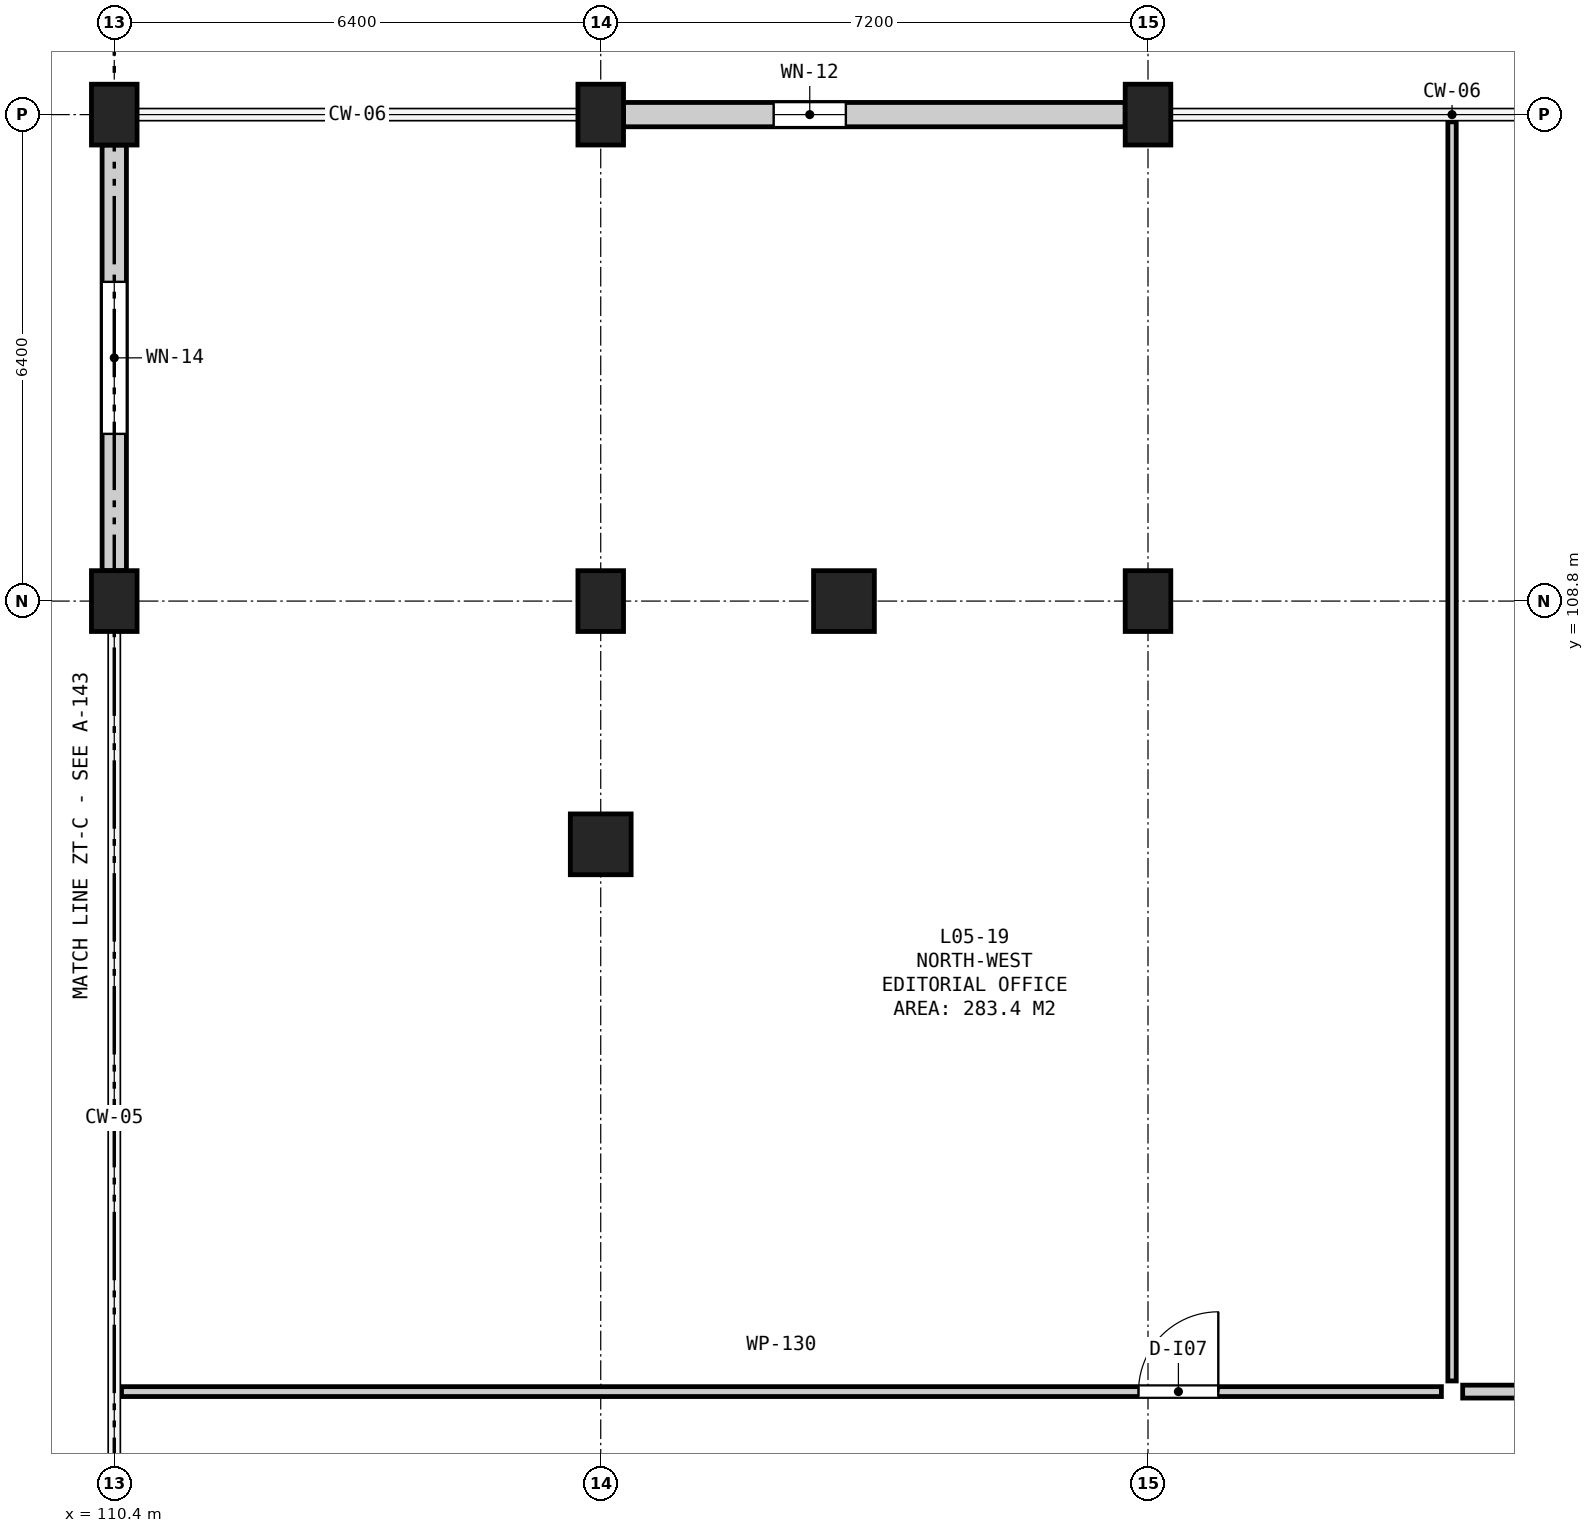
"""IFC4 building model, lengths in metres.
Left out: names, types, materials, properties, quantities, classifications, styles, units other than length and angle.
Written with IfcOpenShell. Run it as: python <this file> out.ifc"""

import sys

from ifc_helpers import new_model, si_unit, direction, frame, frame_2d, origin, origin_2d, place, context, subcontext, project, spatial, rectangle, circle, extrude, element, fill, save


model = new_model("IFC4")
c1 = context("Model", 3, precision=1e-05, world=origin(), true_north=direction((0.0, 1.0)))
c2 = subcontext(c1, "Body", "Model", "MODEL_VIEW")
j1 = project(units=[si_unit("LENGTHUNIT", "METRE"), si_unit("PLANEANGLEUNIT", "RADIAN")], contexts=[c1])
p1 = place(None, origin())
s1 = spatial("IfcSite", under=j1, at=p1, CompositionType="ELEMENT")
p2 = place(p1, origin())
s2 = spatial("IfcBuilding", under=s1, at=p2, CompositionType="ELEMENT")
p3 = place(p2, frame((0.0, 0.0, 23.8)))
s3 = spatial("IfcBuildingStorey", under=s2, at=p3, CompositionType="ELEMENT", Elevation=23.8)
for number, where, z_axis, x_axis in (
    (1, (110.4, 108.8, 0.0), (0.0, 0.0, 1.0), (1.0, 0.0, 0.0)),
    (2, (110.4, 115.2, 0.0), (0.0, 0.0, 1.0), (1.0, 0.0, 0.0)),
):
    element("IfcColumn", number, at=place(p3, frame(where, z_axis=z_axis, x_axis=x_axis)), inside=s3, PredefinedType="COLUMN", context=c2, shape_type="SweptSolid", body=[
        extrude(rectangle(XDim=0.6, YDim=0.8, at=origin_2d()), origin(), (0.0, 0.0, 1.0), 4.0),
    ])
p4 = place(p3, frame((116.8, 105.6, 0.0), z_axis=(0.0, 0.0, 1.0), x_axis=(1.0, 0.0, 0.0)))
e3 = element("IfcColumn", 3, at=p4, inside=s3, PredefinedType="COLUMN", context=c2, shape_type="SweptSolid", body=[
    extrude(circle(Radius=0.4, at=origin_2d()), origin(), (0.0, 0.0, 1.0), 4.0),
])
for number, where, z_axis, x_axis in (
    (4, (116.8, 108.8, 0.0), (0.0, 0.0, 1.0), (1.0, 0.0, 0.0)),
    (5, (116.8, 115.2, 0.0), (0.0, 0.0, 1.0), (1.0, 0.0, 0.0)),
):
    element("IfcColumn", number, at=place(p3, frame(where, z_axis=z_axis, x_axis=x_axis)), inside=s3, PredefinedType="COLUMN", context=c2, shape_type="SweptSolid", body=[
        extrude(rectangle(XDim=0.6, YDim=0.8, at=origin_2d()), origin(), (0.0, 0.0, 1.0), 4.0),
    ])
p5 = place(p3, frame((120.0, 108.8, 0.0), z_axis=(0.0, 0.0, 1.0), x_axis=(1.0, 0.0, 0.0)))
e6 = element("IfcColumn", 6, at=p5, inside=s3, PredefinedType="COLUMN", context=c2, shape_type="SweptSolid", body=[
    extrude(circle(Radius=0.4, at=origin_2d()), origin(), (0.0, 0.0, 1.0), 4.0),
])
for number, where, z_axis, x_axis in (
    (7, (124.0, 108.8, 0.0), (0.0, 0.0, 1.0), (1.0, 0.0, 0.0)),
    (8, (124.0, 115.2, 0.0), (0.0, 0.0, 1.0), (1.0, 0.0, 0.0)),
):
    element("IfcColumn", number, at=place(p3, frame(where, z_axis=z_axis, x_axis=x_axis)), inside=s3, PredefinedType="COLUMN", context=c2, shape_type="SweptSolid", body=[
        extrude(rectangle(XDim=0.6, YDim=0.8, at=origin_2d()), origin(), (0.0, 0.0, 1.0), 4.0),
    ])
p6 = place(p3, frame((123.7, 115.2, 0.0), z_axis=(0.0, 0.0, 1.0), x_axis=(-1.0, 0.0, 0.0)))
e9 = element("IfcWall", 9, at=p6, inside=s3, PredefinedType="SOLIDWALL", context=c2, shape_type="SweptSolid", body=[
    extrude(rectangle(XDim=6.6, YDim=0.32, at=frame_2d((3.3, 0.0))), origin(), (0.0, 0.0, 1.0), 3.1),
])
p7 = place(p6, frame((3.675, 0.0, 0.9)))
e10 = element("IfcOpeningElement", 10, at=p7, cuts=e9, PredefinedType="OPENING", context=c2, shape_type="SweptSolid", body=[
    extrude(rectangle(XDim=0.95, YDim=1.45, at=frame_2d((0.475, 0.725))), frame((0.0, 0.172, 0.0), z_axis=(0.0, -1.0, 0.0), x_axis=(1.0, 0.0, 0.0)), (0.0, 0.0, 1.0), 0.344),
])
p8 = place(p3, frame((110.4, 114.8, 0.0), z_axis=(0.0, 0.0, 1.0), x_axis=(0.0, -1.0, 0.0)))
e11 = element("IfcWall", 11, at=p8, inside=s3, PredefinedType="SOLIDWALL", context=c2, shape_type="SweptSolid", body=[
    extrude(rectangle(XDim=5.6, YDim=0.32, at=frame_2d((2.8, 0.0))), origin(), (0.0, 0.0, 1.0), 3.1),
])
p9 = place(p8, frame((1.8, 0.0, 0.9)))
e12 = element("IfcOpeningElement", 12, at=p9, cuts=e11, PredefinedType="OPENING", context=c2, shape_type="SweptSolid", body=[
    extrude(rectangle(XDim=2.0, YDim=1.65, at=frame_2d((1.0, 0.825))), frame((0.0, 0.172, 0.0), z_axis=(0.0, -1.0, 0.0), x_axis=(1.0, 0.0, 0.0)), (0.0, 0.0, 1.0), 0.344),
])
p10 = place(p3, frame((110.495, 98.4, 0.0), z_axis=(0.0, 0.0, 1.0), x_axis=(1.0, 0.0, 0.0)))
e13 = element("IfcWall", 13, at=p10, inside=s3, PredefinedType="PARTITIONING", context=c2, shape_type="SweptSolid", body=[
    extrude(rectangle(XDim=17.365, YDim=0.13, at=frame_2d((8.683, 0.0))), origin(), (0.0, 0.0, 1.0), 3.72),
])
p11 = place(p10, frame((13.38, 0.0, 0.0)))
e14 = element("IfcOpeningElement", 14, at=p11, cuts=e13, PredefinedType="OPENING", context=c2, shape_type="SweptSolid", body=[
    extrude(rectangle(XDim=1.05, YDim=2.15, at=frame_2d((0.525, 1.075))), frame((0.0, 0.077, 0.0), z_axis=(0.0, -1.0, 0.0), x_axis=(1.0, 0.0, 0.0)), (0.0, 0.0, 1.0), 0.154),
])
p12 = place(p3, frame((128.0, 98.54, 0.0), z_axis=(0.0, 0.0, 1.0), x_axis=(0.0, 1.0, 0.0)))
e15 = element("IfcWall", 15, at=p12, inside=s3, PredefinedType="PARTITIONING", context=c2, shape_type="SweptSolid", body=[
    extrude(rectangle(XDim=16.565, YDim=0.11, at=frame_2d((8.282, 0.0))), origin(), (0.0, 0.0, 1.0), 3.72),
])
p13 = place(p3, frame((128.14, 98.4, 0.0), z_axis=(0.0, 0.0, 1.0), x_axis=(1.0, 0.0, 0.0)))
e16 = element("IfcWall", 16, at=p13, inside=s3, PredefinedType="PARTITIONING", context=c2, shape_type="SweptSolid", body=[
    extrude(rectangle(XDim=19.72, YDim=0.17, at=frame_2d((9.86, 0.0))), origin(), (0.0, 0.0, 1.0), 3.72),
])
p14 = place(p13, frame((7.335, 0.0, 0.0)))
e17 = element("IfcOpeningElement", 17, at=p14, cuts=e16, PredefinedType="OPENING", context=c2, shape_type="SweptSolid", body=[
    extrude(rectangle(XDim=1.05, YDim=2.15, at=frame_2d((0.525, 1.075))), frame((0.0, 0.097, 0.0), z_axis=(0.0, -1.0, 0.0), x_axis=(1.0, 0.0, 0.0)), (0.0, 0.0, 1.0), 0.194),
])
p15 = place(p7, origin())
e18 = element("IfcWindow", 18, at=p15, inside=s3, PartitioningType="SINGLE_PANEL", PredefinedType="WINDOW", context=c2, shape_type="SweptSolid", body=[
    extrude(rectangle(XDim=0.95, YDim=1.45, at=frame_2d((0.475, 0.725))), frame((0.0, 0.03, 0.0), z_axis=(0.0, -1.0, 0.0), x_axis=(1.0, 0.0, 0.0)), (0.0, 0.0, 1.0), 0.06),
])
fill(e10, e18)
p16 = place(p9, origin())
e19 = element("IfcWindow", 19, at=p16, inside=s3, PartitioningType="DOUBLE_PANEL_HORIZONTAL", PredefinedType="WINDOW", context=c2, shape_type="SweptSolid", body=[
    extrude(rectangle(XDim=2.0, YDim=1.65, at=frame_2d((1.0, 0.825))), frame((0.0, 0.03, 0.0), z_axis=(0.0, -1.0, 0.0), x_axis=(1.0, 0.0, 0.0)), (0.0, 0.0, 1.0), 0.06),
])
fill(e12, e19)
p17 = place(p11, origin())
e20 = element("IfcDoor", 20, at=p17, inside=s3, OperationType="SINGLE_SWING_RIGHT", PredefinedType="DOOR", context=c2, shape_type="SweptSolid", body=[
    extrude(rectangle(XDim=1.05, YDim=2.15, at=frame_2d((0.525, 1.075))), frame((0.0, 0.025, 0.0), z_axis=(0.0, -1.0, 0.0), x_axis=(1.0, 0.0, 0.0)), (0.0, 0.0, 1.0), 0.05),
])
fill(e14, e20)
save(model, sys.argv[1])
